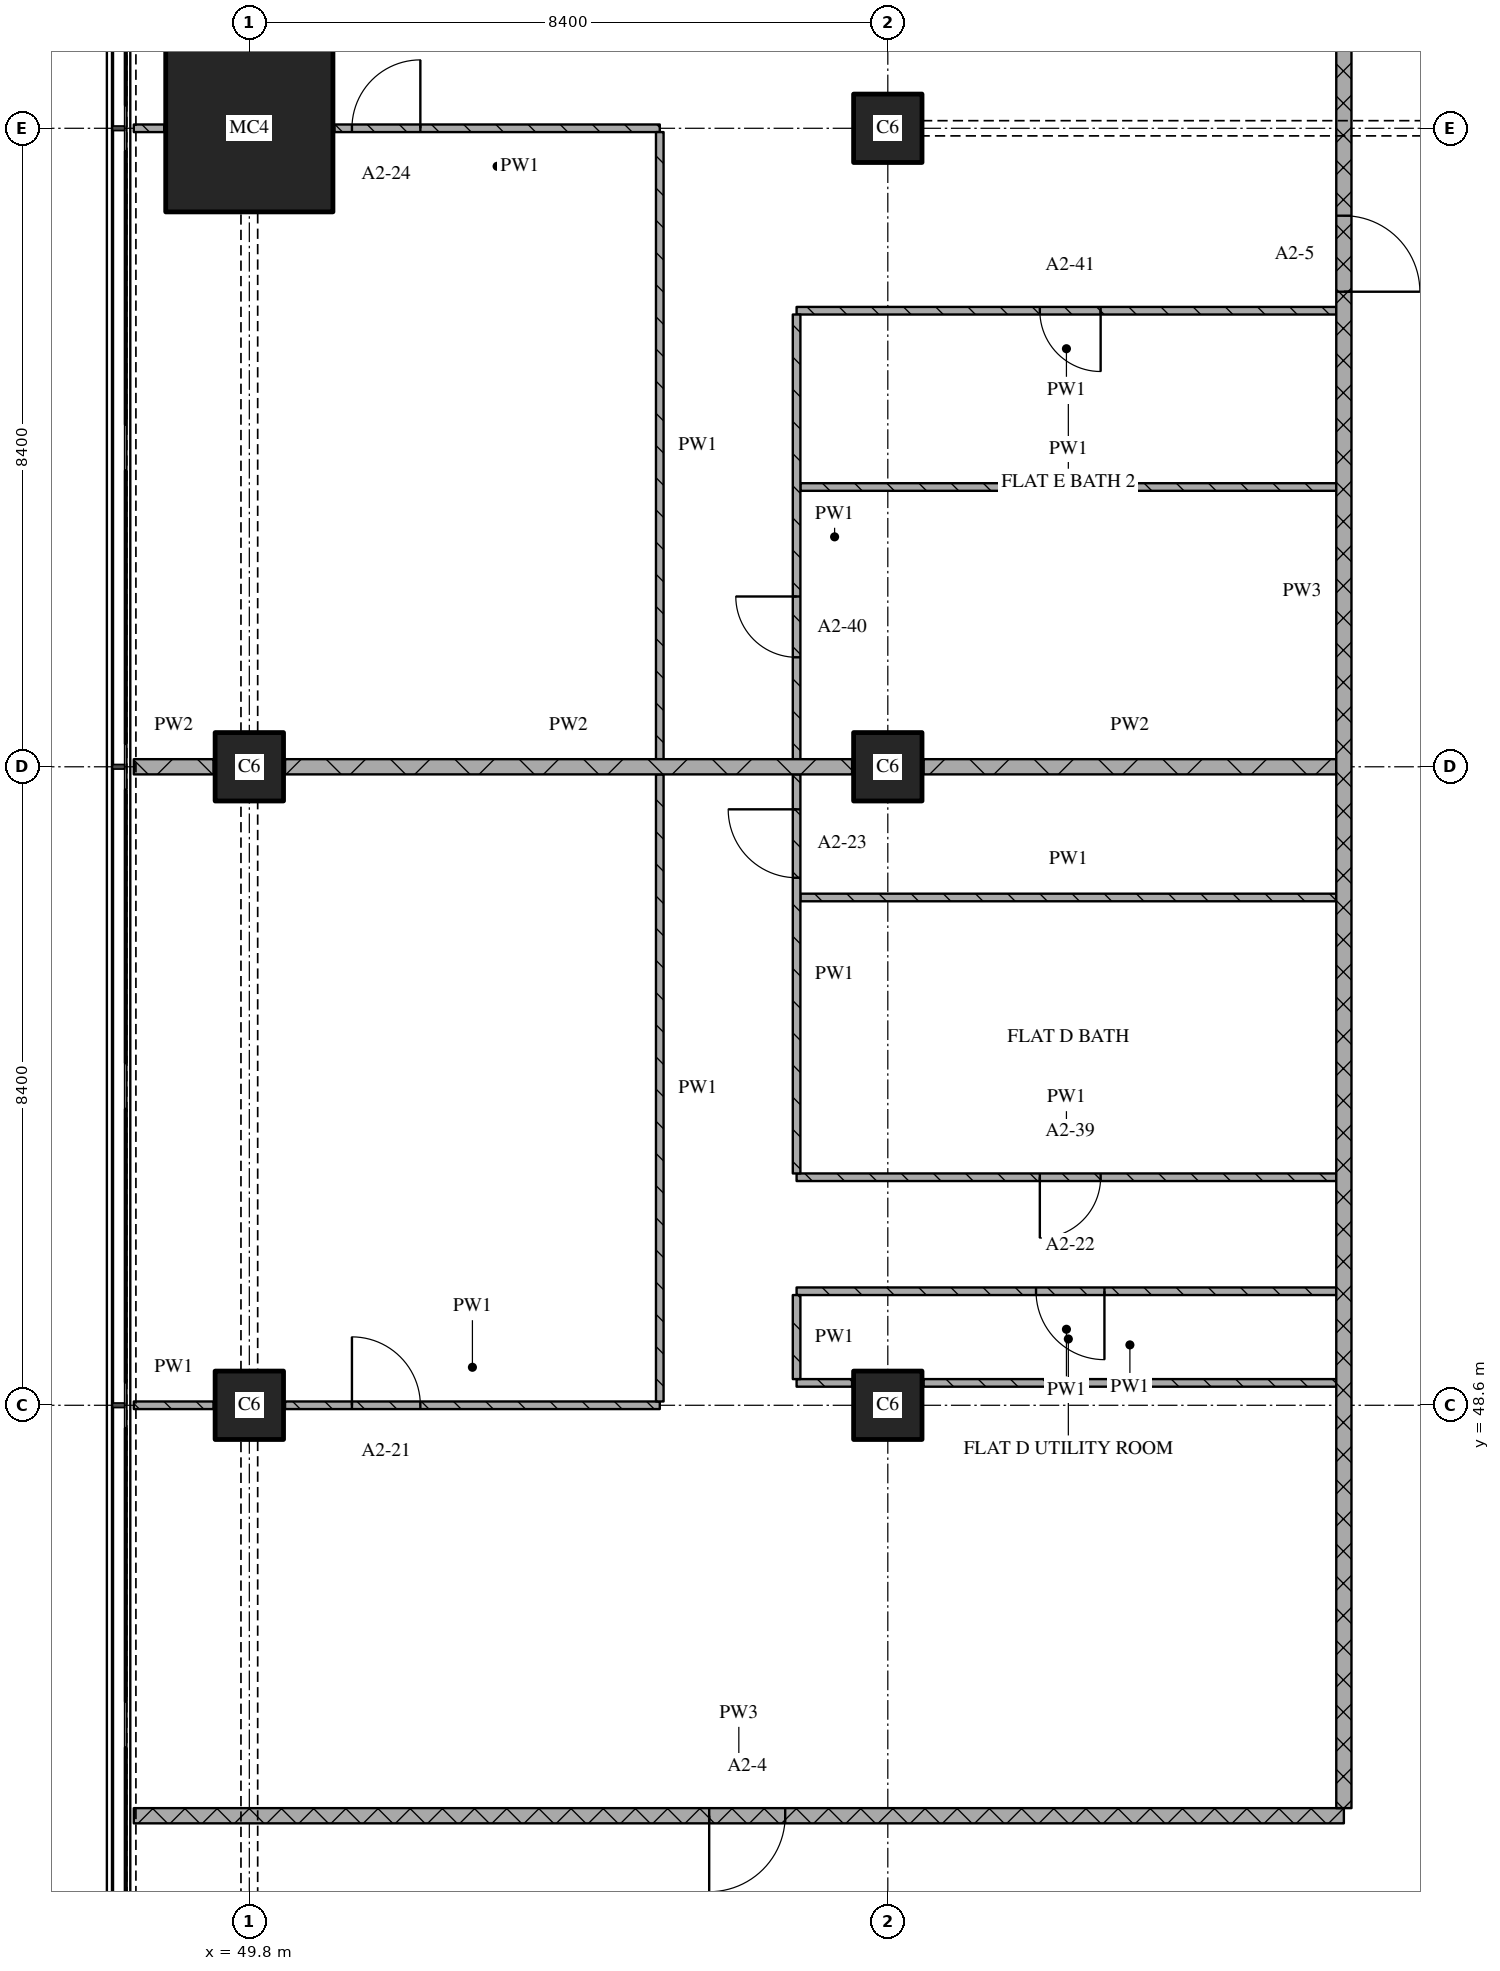
"""IFC4 building model, lengths in metres.
Left out: names, types, materials, properties, quantities, classifications, styles, units other than length and angle.
Written with IfcOpenShell. Run it as: python <this file> out.ifc"""

import sys

from ifc_helpers import new_model, si_unit, direction, frame, frame_2d, origin, origin_2d, place, context, subcontext, project, spatial, rectangle, extrude, element, fill, save


model = new_model("IFC4")
c1 = context("Model", 3, precision=1e-05, world=origin(), true_north=direction((0.0, 1.0)))
c2 = subcontext(c1, "Body", "Model", "MODEL_VIEW")
j1 = project(units=[si_unit("LENGTHUNIT", "METRE"), si_unit("PLANEANGLEUNIT", "RADIAN")], contexts=[c1])
p1 = place(None, origin())
s1 = spatial("IfcSite", under=j1, at=p1, CompositionType="ELEMENT")
p2 = place(p1, origin())
s2 = spatial("IfcBuilding", under=s1, at=p2, CompositionType="ELEMENT")
p3 = place(p2, frame((0.0, 0.0, 51.6)))
s3 = spatial("IfcBuildingStorey", under=s2, at=p3, CompositionType="ELEMENT", Elevation=51.6)
for number, where, z_axis, x_axis in (
    (1, (49.8, 48.6, 0.0), (0.0, 0.0, 1.0), (1.0, 0.0, 0.0)),
    (2, (49.8, 57.0, 0.0), (0.0, 0.0, 1.0), (1.0, 0.0, 0.0)),
):
    element("IfcColumn", number, at=place(p3, frame(where, z_axis=z_axis, x_axis=x_axis)), inside=s3, PredefinedType="COLUMN", context=c2, shape_type="SweptSolid", body=[
        extrude(rectangle(XDim=0.9, YDim=0.9, at=origin_2d()), origin(), (0.0, 0.0, 1.0), 3.6),
    ])
p4 = place(p3, frame((49.8, 65.4, 0.0), z_axis=(0.0, 0.0, 1.0), x_axis=(1.0, 0.0, 0.0)))
e3 = element("IfcColumn", 3, at=p4, inside=s3, PredefinedType="COLUMN", context=c2, shape_type="SweptSolid", body=[
    extrude(rectangle(XDim=2.2, YDim=2.2, at=origin_2d()), origin(), (0.0, 0.0, 1.0), 3.6),
])
for number, where, z_axis, x_axis in (
    (4, (58.2, 48.6, 0.0), (0.0, 0.0, 1.0), (1.0, 0.0, 0.0)),
    (5, (58.2, 57.0, 0.0), (0.0, 0.0, 1.0), (1.0, 0.0, 0.0)),
    (6, (58.2, 65.4, 0.0), (0.0, 0.0, 1.0), (1.0, 0.0, 0.0)),
):
    element("IfcColumn", number, at=place(p3, frame(where, z_axis=z_axis, x_axis=x_axis)), inside=s3, PredefinedType="COLUMN", context=c2, shape_type="SweptSolid", body=[
        extrude(rectangle(XDim=0.9, YDim=0.9, at=origin_2d()), origin(), (0.0, 0.0, 1.0), 3.6),
    ])
p5 = place(p3, frame((48.28, 43.2, 0.0), z_axis=(0.0, 0.0, 1.0), x_axis=(1.0, 0.0, 0.0)))
e7 = element("IfcWall", 7, at=p5, inside=s3, PredefinedType="PARTITIONING", context=c2, shape_type="SweptSolid", body=[
    extrude(rectangle(XDim=15.92, YDim=0.2, at=frame_2d((7.96, 0.0))), origin(), (0.0, 0.0, 1.0), 3.32),
])
p6 = place(p5, frame((7.57, 0.0, 0.0)))
e8 = element("IfcOpeningElement", 8, at=p6, cuts=e7, PredefinedType="OPENING", context=c2, shape_type="SweptSolid", body=[
    extrude(rectangle(XDim=1.0, YDim=2.1, at=frame_2d((0.5, 1.05))), frame((0.0, 0.11, 0.0), z_axis=(0.0, -1.0, 0.0), x_axis=(1.0, 0.0, 0.0)), (0.0, 0.0, 1.0), 0.22),
])
p7 = place(p3, frame((48.28, 48.6, 0.0), z_axis=(0.0, 0.0, 1.0), x_axis=(1.0, 0.0, 0.0)))
e9 = element("IfcWall", 9, at=p7, inside=s3, PredefinedType="PARTITIONING", context=c2, shape_type="SweptSolid", body=[
    extrude(rectangle(XDim=1.05, YDim=0.1, at=frame_2d((0.525, 0.0))), origin(), (0.0, 0.0, 1.0), 3.32),
])
p8 = place(p3, frame((50.27, 48.6, 0.0), z_axis=(0.0, 0.0, 1.0), x_axis=(1.0, 0.0, 0.0)))
e10 = element("IfcWall", 10, at=p8, inside=s3, PredefinedType="PARTITIONING", context=c2, shape_type="SweptSolid", body=[
    extrude(rectangle(XDim=4.93, YDim=0.1, at=frame_2d((2.465, 0.0))), origin(), (0.0, 0.0, 1.0), 3.32),
])
p9 = place(p8, frame((0.88, 0.0, 0.0)))
e11 = element("IfcOpeningElement", 11, at=p9, cuts=e10, PredefinedType="OPENING", context=c2, shape_type="SweptSolid", body=[
    extrude(rectangle(XDim=0.9, YDim=2.1, at=frame_2d((0.45, 1.05))), frame((0.0, 0.06, 0.0), z_axis=(0.0, -1.0, 0.0), x_axis=(1.0, 0.0, 0.0)), (0.0, 0.0, 1.0), 0.12),
])
p10 = place(p3, frame((57.0, 48.894, 0.0), z_axis=(0.0, 0.0, 1.0), x_axis=(1.0, 0.0, 0.0)))
e12 = element("IfcWall", 12, at=p10, inside=s3, PredefinedType="PARTITIONING", context=c2, shape_type="SweptSolid", body=[
    extrude(rectangle(XDim=0.73, YDim=0.1, at=frame_2d((0.365, 0.0))), origin(), (0.0, 0.0, 1.0), 3.32),
])
p11 = place(p3, frame((58.67, 48.894, 0.0), z_axis=(0.0, 0.0, 1.0), x_axis=(1.0, 0.0, 0.0)))
e13 = element("IfcWall", 13, at=p11, inside=s3, PredefinedType="PARTITIONING", context=c2, shape_type="SweptSolid", body=[
    extrude(rectangle(XDim=5.43, YDim=0.1, at=frame_2d((2.715, 0.0))), origin(), (0.0, 0.0, 1.0), 3.32),
])
p12 = place(p3, frame((64.1, 50.1, 0.0), z_axis=(0.0, 0.0, 1.0), x_axis=(-1.0, 0.0, 0.0)))
e14 = element("IfcWall", 14, at=p12, inside=s3, PredefinedType="PARTITIONING", context=c2, shape_type="SweptSolid", body=[
    extrude(rectangle(XDim=7.1, YDim=0.1, at=frame_2d((3.55, 0.0))), origin(), (0.0, 0.0, 1.0), 3.32),
])
p13 = place(p12, frame((3.05, 0.0, 0.0)))
e15 = element("IfcOpeningElement", 15, at=p13, cuts=e14, PredefinedType="OPENING", context=c2, shape_type="SweptSolid", body=[
    extrude(rectangle(XDim=0.9, YDim=2.1, at=frame_2d((0.45, 1.05))), frame((0.0, 0.06, 0.0), z_axis=(0.0, -1.0, 0.0), x_axis=(1.0, 0.0, 0.0)), (0.0, 0.0, 1.0), 0.12),
])
p14 = place(p3, frame((57.0, 51.6, 0.0), z_axis=(0.0, 0.0, 1.0), x_axis=(1.0, 0.0, 0.0)))
e16 = element("IfcWall", 16, at=p14, inside=s3, PredefinedType="PARTITIONING", context=c2, shape_type="SweptSolid", body=[
    extrude(rectangle(XDim=7.1, YDim=0.1, at=frame_2d((3.55, 0.0))), origin(), (0.0, 0.0, 1.0), 3.32),
])
p15 = place(p14, frame((3.2, 0.0, 0.0)))
e17 = element("IfcOpeningElement", 17, at=p15, cuts=e16, PredefinedType="OPENING", context=c2, shape_type="SweptSolid", body=[
    extrude(rectangle(XDim=0.8, YDim=2.1, at=frame_2d((0.4, 1.05))), frame((0.0, 0.06, 0.0), z_axis=(0.0, -1.0, 0.0), x_axis=(1.0, 0.0, 0.0)), (0.0, 0.0, 1.0), 0.12),
])
p16 = place(p3, frame((57.05, 55.281, 0.0), z_axis=(0.0, 0.0, 1.0), x_axis=(1.0, 0.0, 0.0)))
e18 = element("IfcWall", 18, at=p16, inside=s3, PredefinedType="PARTITIONING", context=c2, shape_type="SweptSolid", body=[
    extrude(rectangle(XDim=7.05, YDim=0.1, at=frame_2d((3.525, 0.0))), origin(), (0.0, 0.0, 1.0), 3.32),
])
p17 = place(p3, frame((48.28, 57.0, 0.0), z_axis=(0.0, 0.0, 1.0), x_axis=(1.0, 0.0, 0.0)))
e19 = element("IfcWall", 19, at=p17, inside=s3, PredefinedType="PARTITIONING", context=c2, shape_type="SweptSolid", body=[
    extrude(rectangle(XDim=1.05, YDim=0.2, at=frame_2d((0.525, 0.0))), origin(), (0.0, 0.0, 1.0), 3.32),
])
p18 = place(p3, frame((50.27, 57.0, 0.0), z_axis=(0.0, 0.0, 1.0), x_axis=(1.0, 0.0, 0.0)))
e20 = element("IfcWall", 20, at=p18, inside=s3, PredefinedType="PARTITIONING", context=c2, shape_type="SweptSolid", body=[
    extrude(rectangle(XDim=7.46, YDim=0.2, at=frame_2d((3.73, 0.0))), origin(), (0.0, 0.0, 1.0), 3.32),
])
p19 = place(p3, frame((58.67, 57.0, 0.0), z_axis=(0.0, 0.0, 1.0), x_axis=(1.0, 0.0, 0.0)))
e21 = element("IfcWall", 21, at=p19, inside=s3, PredefinedType="PARTITIONING", context=c2, shape_type="SweptSolid", body=[
    extrude(rectangle(XDim=5.43, YDim=0.2, at=frame_2d((2.715, 0.0))), origin(), (0.0, 0.0, 1.0), 3.32),
])
p20 = place(p3, frame((57.05, 60.681, 0.0), z_axis=(0.0, 0.0, 1.0), x_axis=(1.0, 0.0, 0.0)))
e22 = element("IfcWall", 22, at=p20, inside=s3, PredefinedType="PARTITIONING", context=c2, shape_type="SweptSolid", body=[
    extrude(rectangle(XDim=7.05, YDim=0.1, at=frame_2d((3.525, 0.0))), origin(), (0.0, 0.0, 1.0), 3.32),
])
p21 = place(p3, frame((64.1, 63.0, 0.0), z_axis=(0.0, 0.0, 1.0), x_axis=(-1.0, 0.0, 0.0)))
e23 = element("IfcWall", 23, at=p21, inside=s3, PredefinedType="PARTITIONING", context=c2, shape_type="SweptSolid", body=[
    extrude(rectangle(XDim=7.1, YDim=0.1, at=frame_2d((3.55, 0.0))), origin(), (0.0, 0.0, 1.0), 3.32),
])
p22 = place(p21, frame((3.1, 0.0, 0.0)))
e24 = element("IfcOpeningElement", 24, at=p22, cuts=e23, PredefinedType="OPENING", context=c2, shape_type="SweptSolid", body=[
    extrude(rectangle(XDim=0.8, YDim=2.1, at=frame_2d((0.4, 1.05))), frame((0.0, 0.06, 0.0), z_axis=(0.0, -1.0, 0.0), x_axis=(1.0, 0.0, 0.0)), (0.0, 0.0, 1.0), 0.12),
])
p23 = place(p3, frame((48.28, 65.4, 0.0), z_axis=(0.0, 0.0, 1.0), x_axis=(1.0, 0.0, 0.0)))
e25 = element("IfcWall", 25, at=p23, inside=s3, PredefinedType="PARTITIONING", context=c2, shape_type="SweptSolid", body=[
    extrude(rectangle(XDim=0.4, YDim=0.1, at=frame_2d((0.2, 0.0))), origin(), (0.0, 0.0, 1.0), 3.32),
])
p24 = place(p3, frame((55.2, 65.4, 0.0), z_axis=(0.0, 0.0, 1.0), x_axis=(-1.0, 0.0, 0.0)))
e26 = element("IfcWall", 26, at=p24, inside=s3, PredefinedType="PARTITIONING", context=c2, shape_type="SweptSolid", body=[
    extrude(rectangle(XDim=4.28, YDim=0.1, at=frame_2d((2.14, 0.0))), origin(), (0.0, 0.0, 1.0), 3.32),
])
p25 = place(p24, frame((3.15, 0.0, 0.0)))
e27 = element("IfcOpeningElement", 27, at=p25, cuts=e26, PredefinedType="OPENING", context=c2, shape_type="SweptSolid", body=[
    extrude(rectangle(XDim=0.9, YDim=2.1, at=frame_2d((0.45, 1.05))), frame((0.0, 0.06, 0.0), z_axis=(0.0, -1.0, 0.0), x_axis=(1.0, 0.0, 0.0)), (0.0, 0.0, 1.0), 0.12),
])
p26 = place(p3, frame((57.0, 50.05, 0.0), z_axis=(0.0, 0.0, 1.0), x_axis=(0.0, -1.0, 0.0)))
e28 = element("IfcWall", 28, at=p26, inside=s3, PredefinedType="PARTITIONING", context=c2, shape_type="SweptSolid", body=[
    extrude(rectangle(XDim=1.106, YDim=0.1, at=frame_2d((0.553, 0.0))), origin(), (0.0, 0.0, 1.0), 3.32),
])
p27 = place(p3, frame((64.2, 43.3, 0.0), z_axis=(0.0, 0.0, 1.0), x_axis=(0.0, 1.0, 0.0)))
e29 = element("IfcWall", 29, at=p27, inside=s3, PredefinedType="PARTITIONING", context=c2, shape_type="SweptSolid", body=[
    extrude(rectangle(XDim=32.02, YDim=0.2, at=frame_2d((16.01, 0.0))), origin(), (0.0, 0.0, 1.0), 3.32),
])
p28 = place(p27, frame((19.95, 0.0, 0.0)))
e30 = element("IfcOpeningElement", 30, at=p28, cuts=e29, PredefinedType="OPENING", context=c2, shape_type="SweptSolid", body=[
    extrude(rectangle(XDim=1.0, YDim=2.1, at=frame_2d((0.5, 1.05))), frame((0.0, 0.11, 0.0), z_axis=(0.0, -1.0, 0.0), x_axis=(1.0, 0.0, 0.0)), (0.0, 0.0, 1.0), 0.22),
])
for number, where, z_axis, x_axis in (
    (31, (55.2, 56.9, 0.0), (0.0, 0.0, 1.0), (0.0, -1.0, 0.0)),
    (32, (55.2, 65.35, 0.0), (0.0, 0.0, 1.0), (0.0, -1.0, 0.0)),
):
    element("IfcWall", number, at=place(p3, frame(where, z_axis=z_axis, x_axis=x_axis)), inside=s3, PredefinedType="PARTITIONING", context=c2, shape_type="SweptSolid", body=[
        extrude(rectangle(XDim=8.25, YDim=0.1, at=frame_2d((4.125, 0.0))), origin(), (0.0, 0.0, 1.0), 3.32),
    ])
p29 = place(p3, frame((57.0, 56.9, 0.0), z_axis=(0.0, 0.0, 1.0), x_axis=(0.0, -1.0, 0.0)))
e33 = element("IfcWall", 33, at=p29, inside=s3, PredefinedType="PARTITIONING", context=c2, shape_type="SweptSolid", body=[
    extrude(rectangle(XDim=5.25, YDim=0.1, at=frame_2d((2.625, 0.0))), origin(), (0.0, 0.0, 1.0), 3.32),
])
p30 = place(p29, frame((0.46, 0.0, 0.0)))
e34 = element("IfcOpeningElement", 34, at=p30, cuts=e33, PredefinedType="OPENING", context=c2, shape_type="SweptSolid", body=[
    extrude(rectangle(XDim=0.9, YDim=2.1, at=frame_2d((0.45, 1.05))), frame((0.0, 0.06, 0.0), z_axis=(0.0, -1.0, 0.0), x_axis=(1.0, 0.0, 0.0)), (0.0, 0.0, 1.0), 0.12),
])
p31 = place(p3, frame((57.0, 62.95, 0.0), z_axis=(0.0, 0.0, 1.0), x_axis=(0.0, -1.0, 0.0)))
e35 = element("IfcWall", 35, at=p31, inside=s3, PredefinedType="PARTITIONING", context=c2, shape_type="SweptSolid", body=[
    extrude(rectangle(XDim=5.85, YDim=0.1, at=frame_2d((2.925, 0.0))), origin(), (0.0, 0.0, 1.0), 3.32),
])
p32 = place(p31, frame((3.71, 0.0, 0.0)))
e36 = element("IfcOpeningElement", 36, at=p32, cuts=e35, PredefinedType="OPENING", context=c2, shape_type="SweptSolid", body=[
    extrude(rectangle(XDim=0.8, YDim=2.1, at=frame_2d((0.4, 1.05))), frame((0.0, 0.06, 0.0), z_axis=(0.0, -1.0, 0.0), x_axis=(1.0, 0.0, 0.0)), (0.0, 0.0, 1.0), 0.12),
])
p33 = place(p6, origin())
e37 = element("IfcDoor", 37, at=p33, inside=s3, OperationType="SINGLE_SWING_RIGHT", PredefinedType="DOOR", context=c2, shape_type="SweptSolid", body=[
    extrude(rectangle(XDim=1.0, YDim=2.1, at=frame_2d((0.5, 1.05))), frame((0.0, 0.025, 0.0), z_axis=(0.0, -1.0, 0.0), x_axis=(1.0, 0.0, 0.0)), (0.0, 0.0, 1.0), 0.05),
])
fill(e8, e37)
p34 = place(p9, origin())
e38 = element("IfcDoor", 38, at=p34, inside=s3, OperationType="SINGLE_SWING_LEFT", PredefinedType="DOOR", context=c2, shape_type="SweptSolid", body=[
    extrude(rectangle(XDim=0.9, YDim=2.1, at=frame_2d((0.45, 1.05))), frame((0.0, 0.025, 0.0), z_axis=(0.0, -1.0, 0.0), x_axis=(1.0, 0.0, 0.0)), (0.0, 0.0, 1.0), 0.05),
])
fill(e11, e38)
p35 = place(p13, origin())
e39 = element("IfcDoor", 39, at=p35, inside=s3, OperationType="SINGLE_SWING_LEFT", PredefinedType="DOOR", context=c2, shape_type="SweptSolid", body=[
    extrude(rectangle(XDim=0.9, YDim=2.1, at=frame_2d((0.45, 1.05))), frame((0.0, 0.025, 0.0), z_axis=(0.0, -1.0, 0.0), x_axis=(1.0, 0.0, 0.0)), (0.0, 0.0, 1.0), 0.05),
])
fill(e15, e39)
p36 = place(p15, origin())
e40 = element("IfcDoor", 40, at=p36, inside=s3, OperationType="SINGLE_SWING_RIGHT", PredefinedType="DOOR", context=c2, shape_type="SweptSolid", body=[
    extrude(rectangle(XDim=0.8, YDim=2.1, at=frame_2d((0.4, 1.05))), frame((0.0, 0.025, 0.0), z_axis=(0.0, -1.0, 0.0), x_axis=(1.0, 0.0, 0.0)), (0.0, 0.0, 1.0), 0.05),
])
fill(e17, e40)
p37 = place(p22, origin())
e41 = element("IfcDoor", 41, at=p37, inside=s3, OperationType="SINGLE_SWING_LEFT", PredefinedType="DOOR", context=c2, shape_type="SweptSolid", body=[
    extrude(rectangle(XDim=0.8, YDim=2.1, at=frame_2d((0.4, 1.05))), frame((0.0, 0.025, 0.0), z_axis=(0.0, -1.0, 0.0), x_axis=(1.0, 0.0, 0.0)), (0.0, 0.0, 1.0), 0.05),
])
fill(e24, e41)
p38 = place(p25, origin())
e42 = element("IfcDoor", 42, at=p38, inside=s3, OperationType="SINGLE_SWING_RIGHT", PredefinedType="DOOR", context=c2, shape_type="SweptSolid", body=[
    extrude(rectangle(XDim=0.9, YDim=2.1, at=frame_2d((0.45, 1.05))), frame((0.0, 0.025, 0.0), z_axis=(0.0, -1.0, 0.0), x_axis=(1.0, 0.0, 0.0)), (0.0, 0.0, 1.0), 0.05),
])
fill(e27, e42)
p39 = place(p28, origin())
e43 = element("IfcDoor", 43, at=p39, inside=s3, OperationType="SINGLE_SWING_RIGHT", PredefinedType="DOOR", context=c2, shape_type="SweptSolid", body=[
    extrude(rectangle(XDim=1.0, YDim=2.1, at=frame_2d((0.5, 1.05))), frame((0.0, 0.025, 0.0), z_axis=(0.0, -1.0, 0.0), x_axis=(1.0, 0.0, 0.0)), (0.0, 0.0, 1.0), 0.05),
])
fill(e30, e43)
p40 = place(p30, origin())
e44 = element("IfcDoor", 44, at=p40, inside=s3, OperationType="SINGLE_SWING_RIGHT", PredefinedType="DOOR", context=c2, shape_type="SweptSolid", body=[
    extrude(rectangle(XDim=0.9, YDim=2.1, at=frame_2d((0.45, 1.05))), frame((0.0, 0.025, 0.0), z_axis=(0.0, -1.0, 0.0), x_axis=(1.0, 0.0, 0.0)), (0.0, 0.0, 1.0), 0.05),
])
fill(e34, e44)
p41 = place(p32, origin())
e45 = element("IfcDoor", 45, at=p41, inside=s3, OperationType="SINGLE_SWING_RIGHT", PredefinedType="DOOR", context=c2, shape_type="SweptSolid", body=[
    extrude(rectangle(XDim=0.8, YDim=2.1, at=frame_2d((0.4, 1.05))), frame((0.0, 0.025, 0.0), z_axis=(0.0, -1.0, 0.0), x_axis=(1.0, 0.0, 0.0)), (0.0, 0.0, 1.0), 0.05),
])
fill(e36, e45)
save(model, sys.argv[1])
